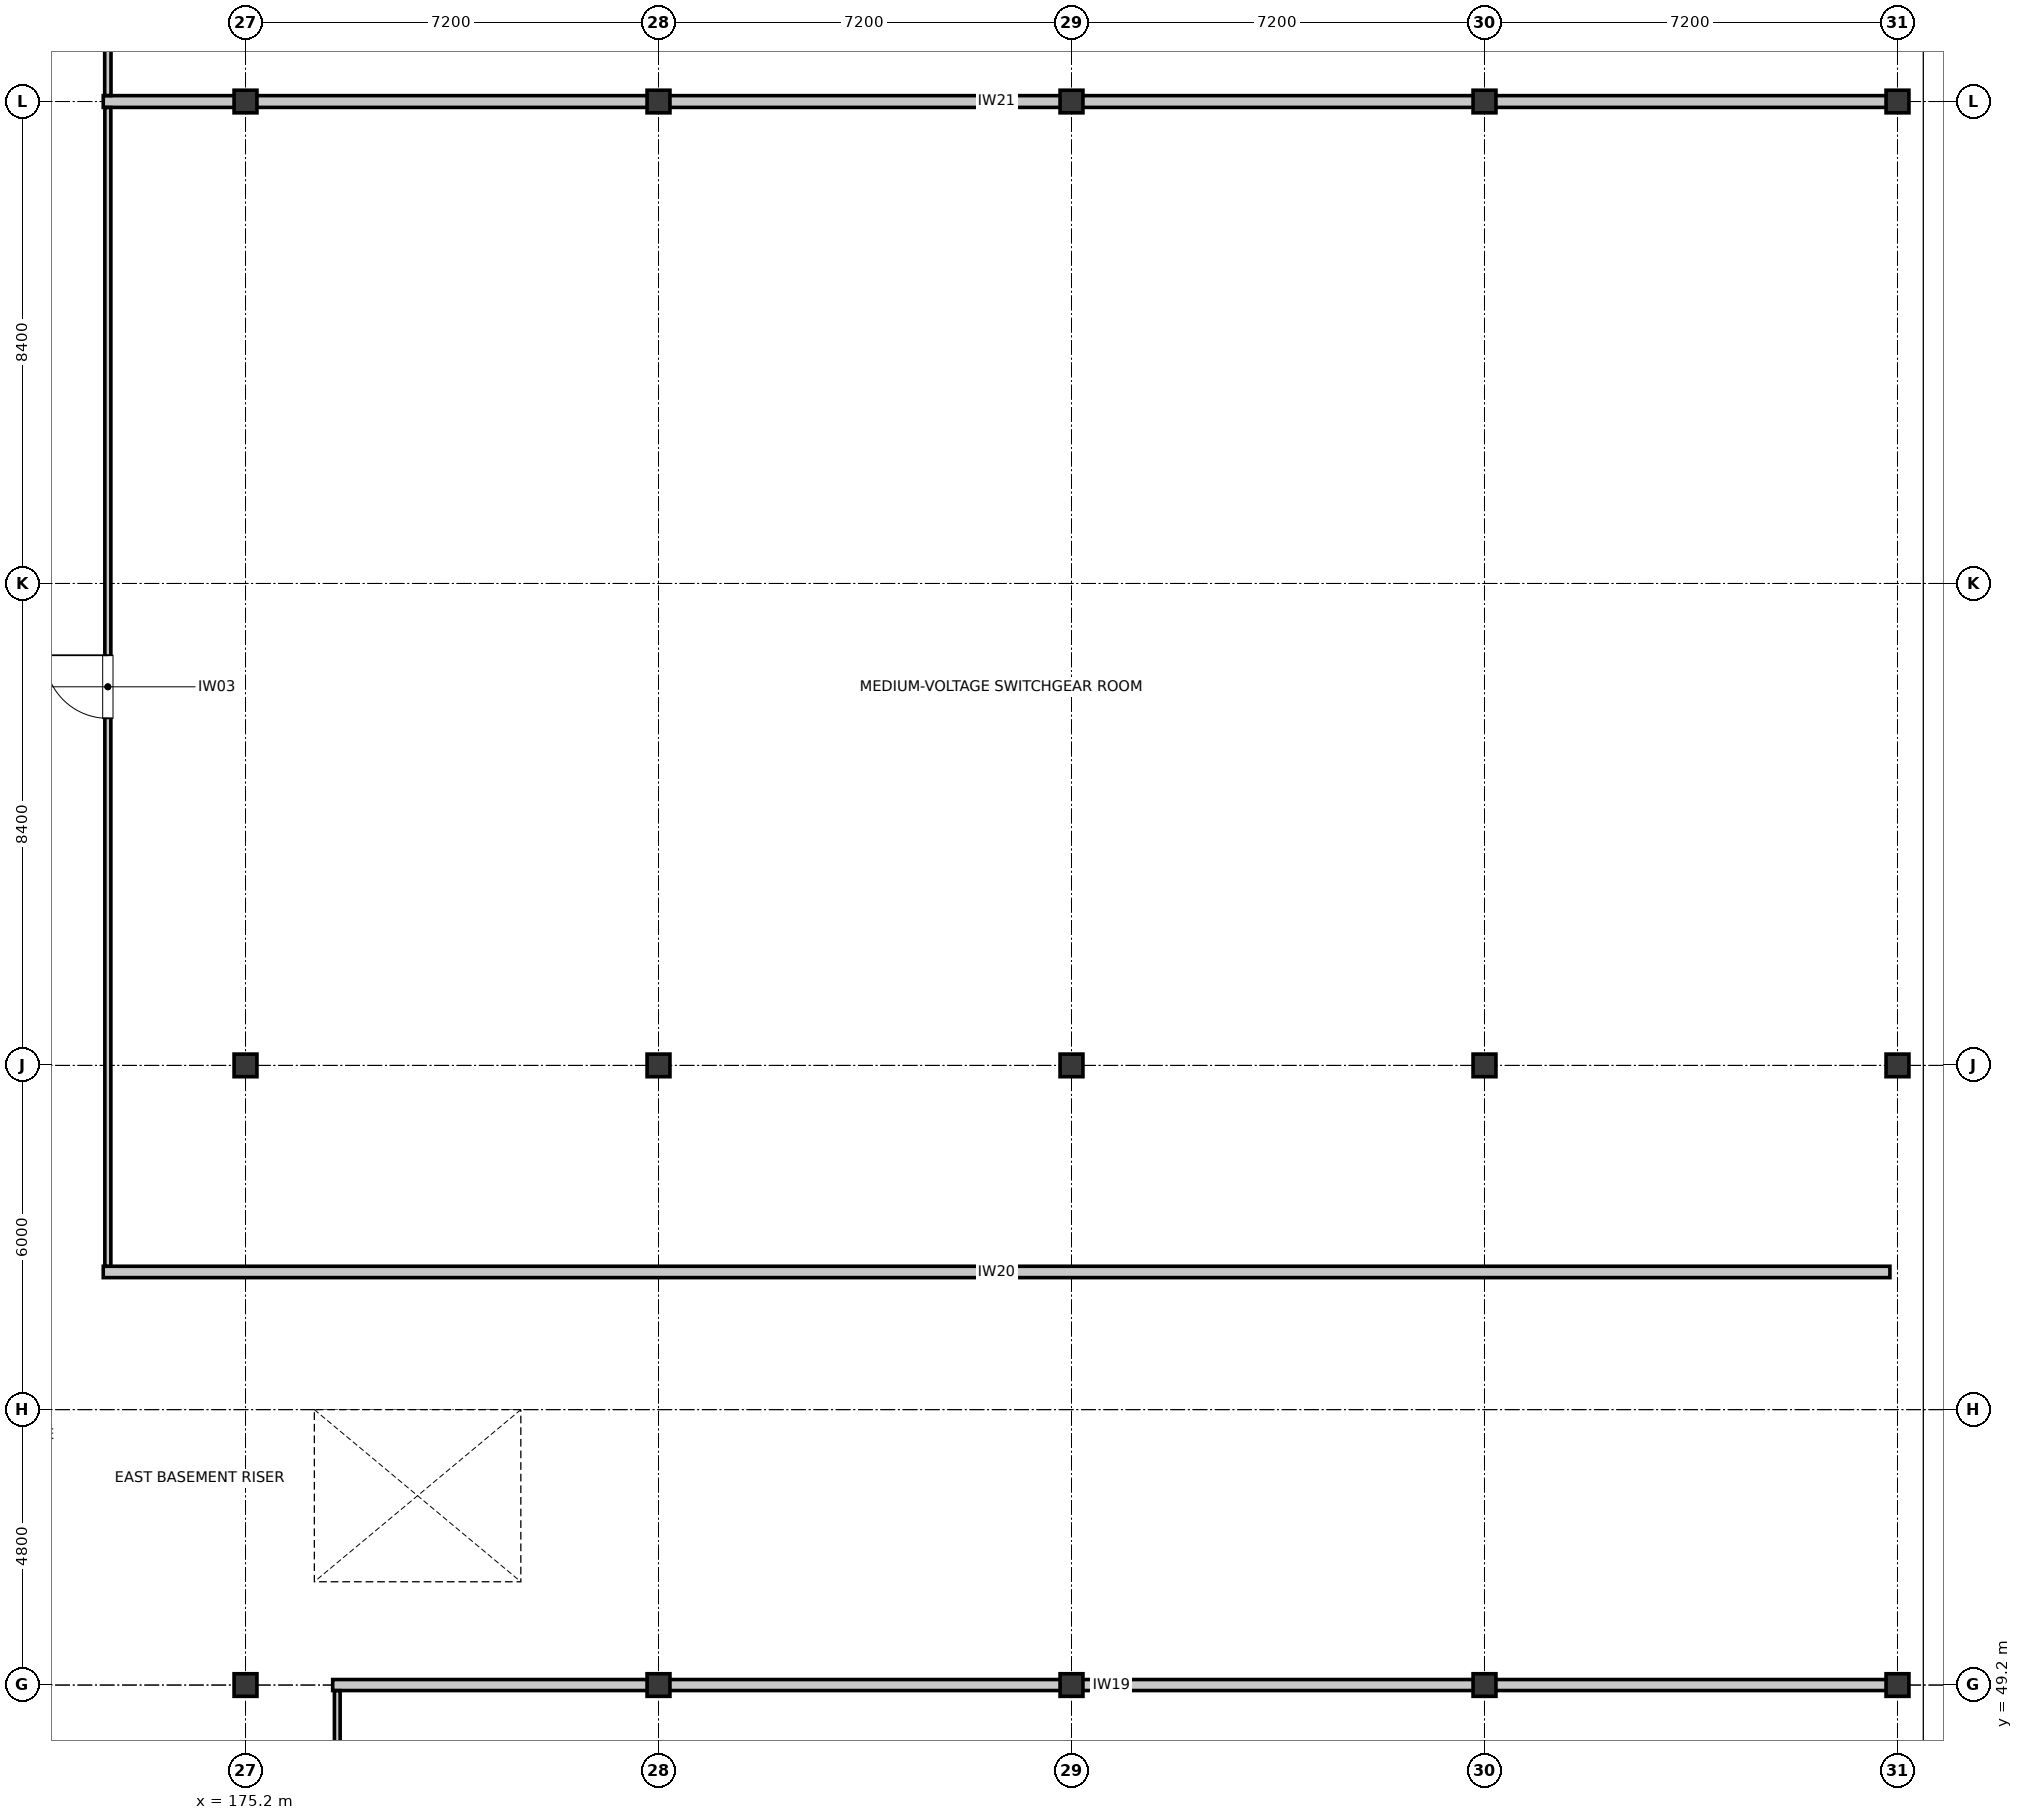
"""IFC4 building model, lengths in metres.
Left out: names, types, materials, properties, quantities, classifications, styles, units other than length and angle.
Written with IfcOpenShell. Run it as: python <this file> out.ifc"""

import sys

from ifc_helpers import new_model, si_unit, direction, frame, frame_2d, origin, origin_2d, place, context, subcontext, project, spatial, rectangle, i_section, extrude, element, fill, save


model = new_model("IFC4")
c1 = context("Model", 3, precision=1e-05, world=origin(), true_north=direction((0.0, 1.0)))
c2 = subcontext(c1, "Body", "Model", "MODEL_VIEW")
j1 = project(units=[si_unit("LENGTHUNIT", "METRE"), si_unit("PLANEANGLEUNIT", "RADIAN")], contexts=[c1])
p1 = place(None, origin())
s1 = spatial("IfcSite", under=j1, at=p1, CompositionType="ELEMENT")
p2 = place(p1, origin())
s2 = spatial("IfcBuilding", under=s1, at=p2, CompositionType="ELEMENT")
p3 = place(p2, frame((0.0, 0.0, -4.5)))
s3 = spatial("IfcBuildingStorey", under=s2, at=p3, CompositionType="ELEMENT", Elevation=-4.5)
for number, where, z_axis, x_axis in (
    (1, (175.2, 49.2, 0.0), (0.0, 0.0, 1.0), (1.0, 0.0, 0.0)),
    (2, (175.2, 60.0, 0.0), (0.0, 0.0, 1.0), (1.0, 0.0, 0.0)),
    (3, (175.2, 76.8, 0.0), (0.0, 0.0, 1.0), (1.0, 0.0, 0.0)),
    (4, (182.4, 49.2, 0.0), (0.0, 0.0, 1.0), (1.0, 0.0, 0.0)),
    (5, (182.4, 60.0, 0.0), (0.0, 0.0, 1.0), (1.0, 0.0, 0.0)),
    (6, (182.4, 76.8, 0.0), (0.0, 0.0, 1.0), (1.0, 0.0, 0.0)),
    (7, (189.6, 49.2, 0.0), (0.0, 0.0, 1.0), (1.0, 0.0, 0.0)),
    (8, (189.6, 60.0, 0.0), (0.0, 0.0, 1.0), (1.0, 0.0, 0.0)),
    (9, (189.6, 76.8, 0.0), (0.0, 0.0, 1.0), (1.0, 0.0, 0.0)),
    (10, (196.8, 49.2, 0.0), (0.0, 0.0, 1.0), (1.0, 0.0, 0.0)),
    (11, (196.8, 60.0, 0.0), (0.0, 0.0, 1.0), (1.0, 0.0, 0.0)),
    (12, (196.8, 76.8, 0.0), (0.0, 0.0, 1.0), (1.0, 0.0, 0.0)),
    (13, (204.0, 49.2, 0.0), (0.0, 0.0, 1.0), (1.0, 0.0, 0.0)),
    (14, (204.0, 60.0, 0.0), (0.0, 0.0, 1.0), (1.0, 0.0, 0.0)),
    (15, (204.0, 76.8, 0.0), (0.0, 0.0, 1.0), (1.0, 0.0, 0.0)),
):
    element("IfcColumn", number, at=place(p3, frame(where, z_axis=z_axis, x_axis=x_axis)), inside=s3, PredefinedType="COLUMN", context=c2, shape_type="SweptSolid", body=[
        extrude(i_section(OverallWidth=0.399, OverallDepth=0.394, WebThickness=0.023, FlangeThickness=0.037, FilletRadius=0.015, at=origin_2d()), origin(), (0.0, 0.0, 1.0), 4.5),
    ])
p4 = place(p3, frame((176.72, 49.2, 0.0), z_axis=(0.0, 0.0, 1.0), x_axis=(1.0, 0.0, 0.0)))
e16 = element("IfcWall", 16, at=p4, inside=s3, PredefinedType="PARTITIONING", context=c2, shape_type="SweptSolid", body=[
    extrude(rectangle(XDim=27.148, YDim=0.192, at=frame_2d((13.574, 0.0))), origin(), (0.0, 0.0, 1.0), 3.403),
])
p5 = place(p3, frame((203.868, 56.4, 0.0), z_axis=(0.0, 0.0, 1.0), x_axis=(-1.0, 0.0, 0.0)))
e17 = element("IfcWall", 17, at=p5, inside=s3, PredefinedType="PARTITIONING", context=c2, shape_type="SweptSolid", body=[
    extrude(rectangle(XDim=31.148, YDim=0.198, at=frame_2d((15.574, 0.0))), origin(), (0.0, 0.0, 1.0), 3.403),
])
p6 = place(p3, frame((172.72, 76.8, 0.0), z_axis=(0.0, 0.0, 1.0), x_axis=(1.0, 0.0, 0.0)))
e18 = element("IfcWall", 18, at=p6, inside=s3, PredefinedType="PARTITIONING", context=c2, shape_type="SweptSolid", body=[
    extrude(rectangle(XDim=31.148, YDim=0.205, at=frame_2d((15.574, 0.0))), origin(), (0.0, 0.0, 1.0), 3.403),
])
p7 = place(p3, frame((176.8, 13.294, 0.0), z_axis=(0.0, 0.0, 1.0), x_axis=(0.0, 1.0, 0.0)))
e19 = element("IfcWall", 19, at=p7, inside=s3, PredefinedType="PARTITIONING", context=c2, shape_type="SweptSolid", body=[
    extrude(rectangle(XDim=35.808, YDim=0.1, at=frame_2d((17.904, 0.0))), origin(), (0.0, 0.0, 1.0), 3.403),
])
p8 = place(p7, frame((17.374, 0.0, 0.0)))
e20 = element("IfcOpeningElement", 20, at=p8, cuts=e19, PredefinedType="OPENING", context=c2, shape_type="SweptSolid", body=[
    extrude(rectangle(XDim=1.06, YDim=2.1, at=frame_2d((0.53, 1.05))), frame((0.0, 0.06, 0.0), z_axis=(0.0, -1.0, 0.0), x_axis=(1.0, 0.0, 0.0)), (0.0, 0.0, 1.0), 0.12),
])
p9 = place(p3, frame((172.8, 56.501, 0.0), z_axis=(0.0, 0.0, 1.0), x_axis=(0.0, 1.0, 0.0)))
e21 = element("IfcWall", 21, at=p9, inside=s3, PredefinedType="PARTITIONING", context=c2, shape_type="SweptSolid", body=[
    extrude(rectangle(XDim=20.195, YDim=0.105, at=frame_2d((10.098, 0.0))), origin(), (0.0, 0.0, 1.0), 3.403),
])
p10 = place(p9, frame((9.548, 0.0, 0.0)))
e22 = element("IfcOpeningElement", 22, at=p10, cuts=e21, PredefinedType="OPENING", context=c2, shape_type="SweptSolid", body=[
    extrude(rectangle(XDim=1.1, YDim=2.1, at=frame_2d((0.55, 1.05))), frame((0.0, 0.062, 0.0), z_axis=(0.0, -1.0, 0.0), x_axis=(1.0, 0.0, 0.0)), (0.0, 0.0, 1.0), 0.125),
])
p11 = place(p3, frame((172.8, 76.904, 0.0), z_axis=(0.0, 0.0, 1.0), x_axis=(0.0, 1.0, 0.0)))
e23 = element("IfcWall", 23, at=p11, inside=s3, PredefinedType="PARTITIONING", context=c2, shape_type="SweptSolid", body=[
    extrude(rectangle(XDim=21.388, YDim=0.11, at=frame_2d((10.694, 0.0))), origin(), (0.0, 0.0, 1.0), 3.403),
])
p12 = place(p11, frame((10.119, 0.0, 0.0)))
e24 = element("IfcOpeningElement", 24, at=p12, cuts=e23, PredefinedType="OPENING", context=c2, shape_type="SweptSolid", body=[
    extrude(rectangle(XDim=1.15, YDim=2.1, at=frame_2d((0.575, 1.05))), frame((0.0, 0.065, 0.0), z_axis=(0.0, -1.0, 0.0), x_axis=(1.0, 0.0, 0.0)), (0.0, 0.0, 1.0), 0.13),
])
p13 = place(p10, origin())
e25 = element("IfcDoor", 25, at=p13, inside=s3, OperationType="SINGLE_SWING_RIGHT", PredefinedType="DOOR", context=c2, shape_type="SweptSolid", body=[
    extrude(rectangle(XDim=1.1, YDim=2.1, at=frame_2d((0.55, 1.05))), frame((0.0, 0.025, 0.0), z_axis=(0.0, -1.0, 0.0), x_axis=(1.0, 0.0, 0.0)), (0.0, 0.0, 1.0), 0.05),
])
fill(e22, e25)
save(model, sys.argv[1])
